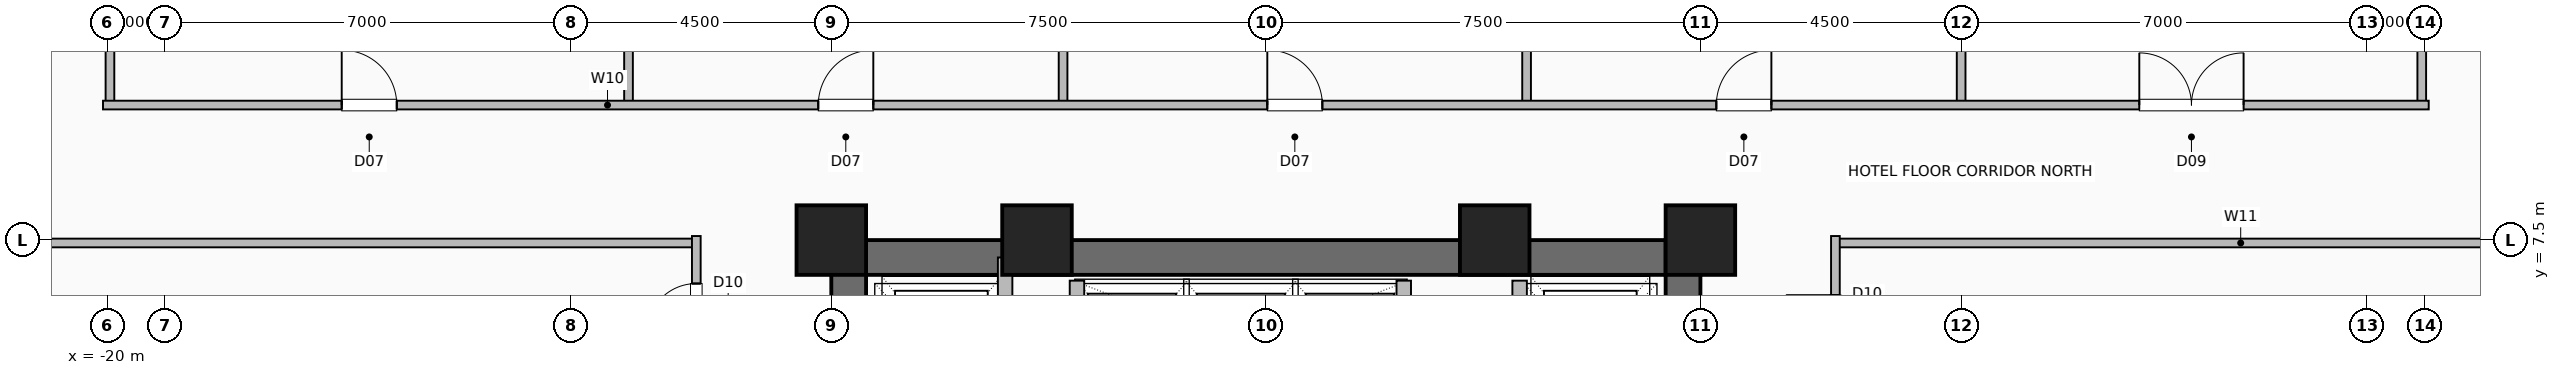
"""IFC4 building model, lengths in metres.
Left out: names, types, materials, properties, quantities, classifications, styles, units other than length and angle.
Written with IfcOpenShell. Run it as: python <this file> out.ifc"""

import sys

from ifc_helpers import new_model, si_unit, direction, frame, frame_2d, origin, origin_2d, place, context, subcontext, project, spatial, rectangle, hollow_rectangle, extrude, element, fill, save


model = new_model("IFC4")
c1 = context("Model", 3, precision=1e-05, world=origin(), true_north=direction((0.0, 1.0)))
c2 = subcontext(c1, "Body", "Model", "MODEL_VIEW")
j1 = project(units=[si_unit("LENGTHUNIT", "METRE"), si_unit("PLANEANGLEUNIT", "RADIAN")], contexts=[c1])
p1 = place(None, origin())
s1 = spatial("IfcSite", under=j1, at=p1, CompositionType="ELEMENT")
p2 = place(p1, origin())
s2 = spatial("IfcBuilding", under=s1, at=p2, CompositionType="ELEMENT")
p3 = place(p2, frame((0.0, 0.0, 65.5)))
s3 = spatial("IfcBuildingStorey", under=s2, at=p3, CompositionType="ELEMENT", Elevation=65.5)
for number, where, z_axis, x_axis in (
    (1, (7.5, 7.5, 0.0), (0.0, 0.0, 1.0), (1.0, 0.0, 0.0)),
    (2, (3.95, 7.5, 0.0), (0.0, 0.0, 1.0), (1.0, 0.0, 0.0)),
    (3, (-3.95, 7.5, 0.0), (0.0, 0.0, 1.0), (1.0, 0.0, 0.0)),
    (4, (-7.5, 7.5, 0.0), (0.0, 0.0, 1.0), (1.0, 0.0, 0.0)),
):
    element("IfcColumn", number, at=place(p3, frame(where, z_axis=z_axis, x_axis=x_axis)), inside=s3, PredefinedType="COLUMN", context=c2, shape_type="SweptSolid", body=[
        extrude(hollow_rectangle(XDim=1.2, YDim=1.2, WallThickness=0.055, at=origin_2d()), origin(), (0.0, 0.0, 1.0), 3.5),
    ])
p4 = place(p3, frame((-7.5, 7.2, 0.0), z_axis=(0.0, 0.0, 1.0), x_axis=(1.0, 0.0, 0.0)))
e5 = element("IfcWall", 5, at=p4, inside=s3, PredefinedType="SHEAR", context=c2, shape_type="SweptSolid", body=[
    extrude(rectangle(XDim=15.0, YDim=0.6, at=frame_2d((7.5, 0.0))), origin(), (0.0, 0.0, 1.0), 3.25),
])
p5 = place(p3, frame((-7.2, -7.5, 0.0), z_axis=(0.0, 0.0, 1.0), x_axis=(0.0, 1.0, 0.0)))
e6 = element("IfcWall", 6, at=p5, inside=s3, PredefinedType="SHEAR", context=c2, shape_type="SweptSolid", body=[
    extrude(rectangle(XDim=15.0, YDim=0.6, at=frame_2d((7.5, 0.0))), origin(), (0.0, 0.0, 1.0), 3.25),
])
p6 = place(p5, frame((9.5, 0.0, 0.0)))
e7 = element("IfcOpeningElement", 7, at=p6, cuts=e6, PredefinedType="OPENING", context=c2, shape_type="SweptSolid", body=[
    extrude(rectangle(XDim=1.0, YDim=2.08, at=frame_2d((0.5, 1.04))), frame((0.0, 0.31, 0.0), z_axis=(0.0, -1.0, 0.0), x_axis=(1.0, 0.0, 0.0)), (0.0, 0.0, 1.0), 0.62),
])
p7 = place(p3, frame((7.2, -7.5, 0.0), z_axis=(0.0, 0.0, 1.0), x_axis=(0.0, 1.0, 0.0)))
e8 = element("IfcWall", 8, at=p7, inside=s3, PredefinedType="SHEAR", context=c2, shape_type="SweptSolid", body=[
    extrude(rectangle(XDim=15.0, YDim=0.6, at=frame_2d((7.5, 0.0))), origin(), (0.0, 0.0, 1.0), 3.25),
])
for number, where, z_axis, x_axis in (
    (9, (-3.26, 4.58, 0.0), (0.0, 0.0, 1.0), (0.0, 1.0, 0.0)),
    (10, (2.38, 4.58, 0.0), (0.0, 0.0, 1.0), (0.0, 1.0, 0.0)),
):
    element("IfcWall", number, at=place(p3, frame(where, z_axis=z_axis, x_axis=x_axis)), inside=s3, PredefinedType="SHEAR", context=c2, shape_type="SweptSolid", body=[
        extrude(rectangle(XDim=2.22, YDim=0.25, at=frame_2d((1.11, 0.0))), origin(), (0.0, 0.0, 1.0), 3.25),
    ])
p8 = place(p3, frame((-4.5, 4.35, 0.0), z_axis=(0.0, 0.0, 1.0), x_axis=(0.0, 1.0, 0.0)))
e11 = element("IfcWall", 11, at=p8, inside=s3, PredefinedType="SHEAR", context=c2, shape_type="SweptSolid", body=[
    extrude(rectangle(XDim=2.85, YDim=0.25, at=frame_2d((1.425, 0.0))), origin(), (0.0, 0.0, 1.0), 3.25),
])
p9 = place(p3, frame((4.38, 4.3, 0.0), z_axis=(0.0, 0.0, 1.0), x_axis=(0.0, 1.0, 0.0)))
e12 = element("IfcWall", 12, at=p9, inside=s3, PredefinedType="SHEAR", context=c2, shape_type="SweptSolid", body=[
    extrude(rectangle(XDim=2.5, YDim=0.25, at=frame_2d((1.25, 0.0))), origin(), (0.0, 0.0, 1.0), 3.25),
])
p10 = place(p9, frame((0.8, 0.0, 0.0)))
e13 = element("IfcOpeningElement", 13, at=p10, cuts=e12, PredefinedType="OPENING", context=c2, shape_type="SweptSolid", body=[
    extrude(rectangle(XDim=1.2, YDim=2.2, at=frame_2d((0.6, 1.1))), frame((0.0, 0.135, 0.0), z_axis=(0.0, -1.0, 0.0), x_axis=(1.0, 0.0, 0.0)), (0.0, 0.0, 1.0), 0.27),
])
for number, where, z_axis, x_axis in (
    (14, (-19.95, 9.83, 0.0), (0.0, 0.0, 1.0), (0.0, 1.0, 0.0)),
    (15, (-11.0, 9.83, 0.0), (0.0, 0.0, 1.0), (0.0, 1.0, 0.0)),
    (16, (-3.5, 9.83, 0.0), (0.0, 0.0, 1.0), (0.0, 1.0, 0.0)),
    (17, (4.5, 9.83, 0.0), (0.0, 0.0, 1.0), (0.0, 1.0, 0.0)),
    (18, (12.0, 9.83, 0.0), (0.0, 0.0, 1.0), (0.0, 1.0, 0.0)),
    (19, (19.95, 9.83, 0.0), (0.0, 0.0, 1.0), (0.0, 1.0, 0.0)),
):
    element("IfcWall", number, at=place(p3, frame(where, z_axis=z_axis, x_axis=x_axis)), inside=s3, PredefinedType="PARTITIONING", context=c2, shape_type="SweptSolid", body=[
        extrude(rectangle(XDim=13.99, YDim=0.15, at=frame_2d((6.995, 0.0))), origin(), (0.0, 0.0, 1.0), 3.25),
    ])
p11 = place(p3, frame((-20.07, 9.83, 0.0), z_axis=(0.0, 0.0, 1.0), x_axis=(1.0, 0.0, 0.0)))
e20 = element("IfcWall", 20, at=p11, inside=s3, PredefinedType="PARTITIONING", context=c2, shape_type="SweptSolid", body=[
    extrude(rectangle(XDim=40.14, YDim=0.15, at=frame_2d((20.07, 0.0))), origin(), (0.0, 0.0, 1.0), 3.25),
])
p12 = place(p11, frame((4.12, 0.0, 0.0)))
e21 = element("IfcOpeningElement", 21, at=p12, cuts=e20, PredefinedType="OPENING", context=c2, shape_type="SweptSolid", body=[
    extrude(rectangle(XDim=0.95, YDim=2.06, at=frame_2d((0.475, 1.03))), frame((0.0, 0.085, 0.0), z_axis=(0.0, -1.0, 0.0), x_axis=(1.0, 0.0, 0.0)), (0.0, 0.0, 1.0), 0.17),
])
p13 = place(p11, frame((12.345, 0.0, 0.0)))
e22 = element("IfcOpeningElement", 22, at=p13, cuts=e20, PredefinedType="OPENING", context=c2, shape_type="SweptSolid", body=[
    extrude(rectangle(XDim=0.95, YDim=2.06, at=frame_2d((0.475, 1.03))), frame((0.0, 0.085, 0.0), z_axis=(0.0, -1.0, 0.0), x_axis=(1.0, 0.0, 0.0)), (0.0, 0.0, 1.0), 0.17),
])
p14 = place(p11, frame((20.095, 0.0, 0.0)))
e23 = element("IfcOpeningElement", 23, at=p14, cuts=e20, PredefinedType="OPENING", context=c2, shape_type="SweptSolid", body=[
    extrude(rectangle(XDim=0.95, YDim=2.06, at=frame_2d((0.475, 1.03))), frame((0.0, 0.085, 0.0), z_axis=(0.0, -1.0, 0.0), x_axis=(1.0, 0.0, 0.0)), (0.0, 0.0, 1.0), 0.17),
])
p15 = place(p11, frame((27.845, 0.0, 0.0)))
e24 = element("IfcOpeningElement", 24, at=p15, cuts=e20, PredefinedType="OPENING", context=c2, shape_type="SweptSolid", body=[
    extrude(rectangle(XDim=0.95, YDim=2.06, at=frame_2d((0.475, 1.03))), frame((0.0, 0.085, 0.0), z_axis=(0.0, -1.0, 0.0), x_axis=(1.0, 0.0, 0.0)), (0.0, 0.0, 1.0), 0.17),
])
p16 = place(p11, frame((35.145, 0.0, 0.0)))
e25 = element("IfcOpeningElement", 25, at=p16, cuts=e20, PredefinedType="OPENING", context=c2, shape_type="SweptSolid", body=[
    extrude(rectangle(XDim=1.8, YDim=2.08, at=frame_2d((0.9, 1.04))), frame((0.0, 0.085, 0.0), z_axis=(0.0, -1.0, 0.0), x_axis=(1.0, 0.0, 0.0)), (0.0, 0.0, 1.0), 0.17),
])
p17 = place(p3, frame((-23.82, 7.45, 0.0), z_axis=(0.0, 0.0, 1.0), x_axis=(1.0, 0.0, 0.0)))
e26 = element("IfcWall", 26, at=p17, inside=s3, PredefinedType="PARTITIONING", context=c2, shape_type="SweptSolid", body=[
    extrude(rectangle(XDim=13.99, YDim=0.15, at=frame_2d((6.995, 0.0))), origin(), (0.0, 0.0, 1.0), 3.25),
])
p18 = place(p3, frame((-9.83, -7.57, 0.0), z_axis=(0.0, 0.0, 1.0), x_axis=(0.0, 1.0, 0.0)))
e27 = element("IfcWall", 27, at=p18, inside=s3, PredefinedType="PARTITIONING", context=c2, shape_type="SweptSolid", body=[
    extrude(rectangle(XDim=15.14, YDim=0.15, at=frame_2d((7.57, 0.0))), origin(), (0.0, 0.0, 1.0), 3.25),
])
p19 = place(p18, frame((2.62, 0.0, 0.0)))
e28 = element("IfcOpeningElement", 28, at=p19, cuts=e27, PredefinedType="OPENING", context=c2, shape_type="SweptSolid", body=[
    extrude(rectangle(XDim=0.95, YDim=2.06, at=frame_2d((0.475, 1.03))), frame((0.0, 0.085, 0.0), z_axis=(0.0, -1.0, 0.0), x_axis=(1.0, 0.0, 0.0)), (0.0, 0.0, 1.0), 0.17),
])
p20 = place(p18, frame((8.945, 0.0, 0.0)))
e29 = element("IfcOpeningElement", 29, at=p20, cuts=e27, PredefinedType="OPENING", context=c2, shape_type="SweptSolid", body=[
    extrude(rectangle(XDim=0.95, YDim=2.06, at=frame_2d((0.475, 1.03))), frame((0.0, 0.085, 0.0), z_axis=(0.0, -1.0, 0.0), x_axis=(1.0, 0.0, 0.0)), (0.0, 0.0, 1.0), 0.17),
])
p21 = place(p18, frame((13.47, 0.0, 0.0)))
e30 = element("IfcOpeningElement", 30, at=p21, cuts=e27, PredefinedType="OPENING", context=c2, shape_type="SweptSolid", body=[
    extrude(rectangle(XDim=0.85, YDim=2.05, at=frame_2d((0.425, 1.025))), frame((0.0, 0.085, 0.0), z_axis=(0.0, -1.0, 0.0), x_axis=(1.0, 0.0, 0.0)), (0.0, 0.0, 1.0), 0.17),
])
p22 = place(p3, frame((9.83, 7.45, 0.0), z_axis=(0.0, 0.0, 1.0), x_axis=(1.0, 0.0, 0.0)))
e31 = element("IfcWall", 31, at=p22, inside=s3, PredefinedType="PARTITIONING", context=c2, shape_type="SweptSolid", body=[
    extrude(rectangle(XDim=13.99, YDim=0.15, at=frame_2d((6.995, 0.0))), origin(), (0.0, 0.0, 1.0), 3.25),
])
p23 = place(p3, frame((9.83, -7.57, 0.0), z_axis=(0.0, 0.0, 1.0), x_axis=(0.0, 1.0, 0.0)))
e32 = element("IfcWall", 32, at=p23, inside=s3, PredefinedType="PARTITIONING", context=c2, shape_type="SweptSolid", body=[
    extrude(rectangle(XDim=15.14, YDim=0.15, at=frame_2d((7.57, 0.0))), origin(), (0.0, 0.0, 1.0), 3.25),
])
p24 = place(p23, frame((2.62, 0.0, 0.0)))
e33 = element("IfcOpeningElement", 33, at=p24, cuts=e32, PredefinedType="OPENING", context=c2, shape_type="SweptSolid", body=[
    extrude(rectangle(XDim=0.95, YDim=2.06, at=frame_2d((0.475, 1.03))), frame((0.0, 0.085, 0.0), z_axis=(0.0, -1.0, 0.0), x_axis=(1.0, 0.0, 0.0)), (0.0, 0.0, 1.0), 0.17),
])
p25 = place(p23, frame((8.745, 0.0, 0.0)))
e34 = element("IfcOpeningElement", 34, at=p25, cuts=e32, PredefinedType="OPENING", context=c2, shape_type="SweptSolid", body=[
    extrude(rectangle(XDim=0.95, YDim=2.06, at=frame_2d((0.475, 1.03))), frame((0.0, 0.085, 0.0), z_axis=(0.0, -1.0, 0.0), x_axis=(1.0, 0.0, 0.0)), (0.0, 0.0, 1.0), 0.17),
])
p26 = place(p23, frame((13.27, 0.0, 0.0)))
e35 = element("IfcOpeningElement", 35, at=p26, cuts=e32, PredefinedType="OPENING", context=c2, shape_type="SweptSolid", body=[
    extrude(rectangle(XDim=0.85, YDim=2.05, at=frame_2d((0.425, 1.025))), frame((0.0, 0.085, 0.0), z_axis=(0.0, -1.0, 0.0), x_axis=(1.0, 0.0, 0.0)), (0.0, 0.0, 1.0), 0.17),
])
p27 = place(p12, origin())
e36 = element("IfcDoor", 36, at=p27, inside=s3, OperationType="SINGLE_SWING_LEFT", PredefinedType="DOOR", context=c2, shape_type="SweptSolid", body=[
    extrude(rectangle(XDim=0.95, YDim=2.06, at=frame_2d((0.475, 1.03))), frame((0.0, 0.025, 0.0), z_axis=(0.0, -1.0, 0.0), x_axis=(1.0, 0.0, 0.0)), (0.0, 0.0, 1.0), 0.05),
])
fill(e21, e36)
p28 = place(p13, origin())
e37 = element("IfcDoor", 37, at=p28, inside=s3, OperationType="SINGLE_SWING_RIGHT", PredefinedType="DOOR", context=c2, shape_type="SweptSolid", body=[
    extrude(rectangle(XDim=0.95, YDim=2.06, at=frame_2d((0.475, 1.03))), frame((0.0, 0.025, 0.0), z_axis=(0.0, -1.0, 0.0), x_axis=(1.0, 0.0, 0.0)), (0.0, 0.0, 1.0), 0.05),
])
fill(e22, e37)
p29 = place(p14, origin())
e38 = element("IfcDoor", 38, at=p29, inside=s3, OperationType="SINGLE_SWING_LEFT", PredefinedType="DOOR", context=c2, shape_type="SweptSolid", body=[
    extrude(rectangle(XDim=0.95, YDim=2.06, at=frame_2d((0.475, 1.03))), frame((0.0, 0.025, 0.0), z_axis=(0.0, -1.0, 0.0), x_axis=(1.0, 0.0, 0.0)), (0.0, 0.0, 1.0), 0.05),
])
fill(e23, e38)
p30 = place(p15, origin())
e39 = element("IfcDoor", 39, at=p30, inside=s3, OperationType="SINGLE_SWING_RIGHT", PredefinedType="DOOR", context=c2, shape_type="SweptSolid", body=[
    extrude(rectangle(XDim=0.95, YDim=2.06, at=frame_2d((0.475, 1.03))), frame((0.0, 0.025, 0.0), z_axis=(0.0, -1.0, 0.0), x_axis=(1.0, 0.0, 0.0)), (0.0, 0.0, 1.0), 0.05),
])
fill(e24, e39)
p31 = place(p16, origin())
e40 = element("IfcDoor", 40, at=p31, inside=s3, OperationType="DOUBLE_DOOR_SINGLE_SWING", PredefinedType="DOOR", context=c2, shape_type="SweptSolid", body=[
    extrude(rectangle(XDim=1.8, YDim=2.08, at=frame_2d((0.9, 1.04))), frame((0.0, 0.025, 0.0), z_axis=(0.0, -1.0, 0.0), x_axis=(1.0, 0.0, 0.0)), (0.0, 0.0, 1.0), 0.05),
])
fill(e25, e40)
p32 = place(p21, origin())
e41 = element("IfcDoor", 41, at=p32, inside=s3, OperationType="SINGLE_SWING_LEFT", PredefinedType="DOOR", context=c2, shape_type="SweptSolid", body=[
    extrude(rectangle(XDim=0.85, YDim=2.05, at=frame_2d((0.425, 1.025))), frame((0.0, 0.025, 0.0), z_axis=(0.0, -1.0, 0.0), x_axis=(1.0, 0.0, 0.0)), (0.0, 0.0, 1.0), 0.05),
])
fill(e30, e41)
save(model, sys.argv[1])
